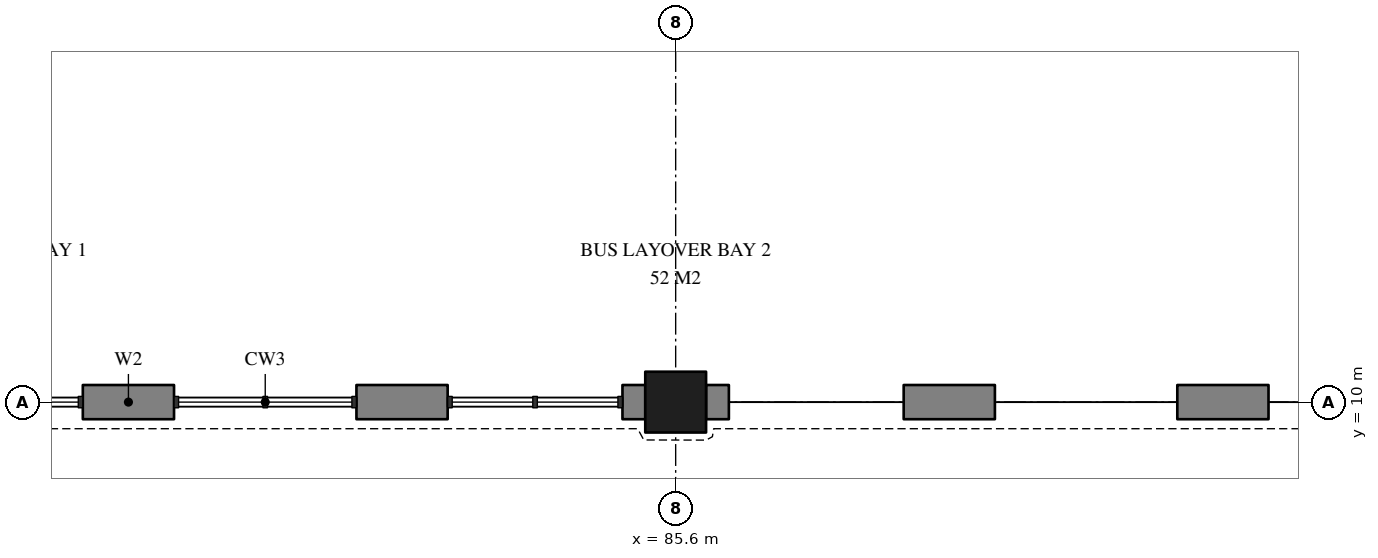
"""IFC4 building model, lengths in metres.
Left out: names, types, materials, properties, quantities, classifications, styles, units other than length and angle.
Written with IfcOpenShell. Run it as: python <this file> out.ifc"""

import sys

from ifc_helpers import new_model, si_unit, direction, frame, frame_2d, origin, origin_2d, place, context, subcontext, project, spatial, rectangle, extrude, element, save


model = new_model("IFC4")
c1 = context("Model", 3, precision=1e-05, world=origin(), true_north=direction((0.0, 1.0)))
c2 = subcontext(c1, "Body", "Model", "MODEL_VIEW")
j1 = project(units=[si_unit("LENGTHUNIT", "METRE"), si_unit("PLANEANGLEUNIT", "RADIAN")], contexts=[c1])
p1 = place(None, origin())
s1 = spatial("IfcSite", under=j1, at=p1, CompositionType="ELEMENT")
p2 = place(p1, origin())
s2 = spatial("IfcBuilding", under=s1, at=p2, CompositionType="ELEMENT")
p3 = place(p2, frame((0.0, 0.0, -5.4)))
s3 = spatial("IfcBuildingStorey", under=s2, at=p3, CompositionType="ELEMENT", Elevation=-5.4)
p4 = place(p3, frame((85.6, 10.0, -0.4), z_axis=(0.0, 0.0, 1.0), x_axis=(1.0, 0.0, 0.0)))
e1 = element("IfcColumn", 1, at=p4, inside=s3, PredefinedType="COLUMN", context=c2, shape_type="SweptSolid", body=[
    extrude(rectangle(XDim=0.8, YDim=0.8, at=origin_2d()), origin(), (0.0, 0.0, 1.0), 5.8),
])
p5 = place(p3, frame((77.8, 10.0, 0.0), z_axis=(0.0, 0.0, 1.0), x_axis=(1.0, 0.0, 0.0)))
e2 = element("IfcWall", 2, at=p5, inside=s3, PredefinedType="SOLIDWALL", context=c2, shape_type="SweptSolid", body=[
    extrude(rectangle(XDim=1.2, YDim=0.45, at=frame_2d((0.6, 0.0))), origin(), (0.0, 0.0, 1.0), 3.8),
])
p6 = place(p3, frame((81.4, 10.0, 0.0), z_axis=(0.0, 0.0, 1.0), x_axis=(1.0, 0.0, 0.0)))
e3 = element("IfcWall", 3, at=p6, inside=s3, PredefinedType="SOLIDWALL", context=c2, shape_type="SweptSolid", body=[
    extrude(rectangle(XDim=1.2, YDim=0.45, at=frame_2d((0.6, 0.0))), origin(), (0.0, 0.0, 1.0), 3.8),
])
p7 = place(p3, frame((84.9, 10.0, 0.0), z_axis=(0.0, 0.0, 1.0), x_axis=(1.0, 0.0, 0.0)))
e4 = element("IfcWall", 4, at=p7, inside=s3, PredefinedType="SOLIDWALL", context=c2, shape_type="SweptSolid", body=[
    extrude(rectangle(XDim=0.3, YDim=0.45, at=frame_2d((0.15, 0.0))), origin(), (0.0, 0.0, 1.0), 4.8),
])
p8 = place(p3, frame((86.0, 10.0, 0.0), z_axis=(0.0, 0.0, 1.0), x_axis=(1.0, 0.0, 0.0)))
e5 = element("IfcWall", 5, at=p8, inside=s3, PredefinedType="SOLIDWALL", context=c2, shape_type="SweptSolid", body=[
    extrude(rectangle(XDim=0.3, YDim=0.45, at=frame_2d((0.15, 0.0))), origin(), (0.0, 0.0, 1.0), 3.8),
])
for number, where, z_axis, x_axis in (
    (6, (88.6, 10.0, 0.0), (0.0, 0.0, 1.0), (1.0, 0.0, 0.0)),
    (7, (92.2, 10.0, 0.0), (0.0, 0.0, 1.0), (1.0, 0.0, 0.0)),
):
    element("IfcWall", number, at=place(p3, frame(where, z_axis=z_axis, x_axis=x_axis)), inside=s3, PredefinedType="SOLIDWALL", context=c2, shape_type="SweptSolid", body=[
        extrude(rectangle(XDim=1.2, YDim=0.45, at=frame_2d((0.6, 0.0))), origin(), (0.0, 0.0, 1.0), 3.8),
    ])
save(model, sys.argv[1])
